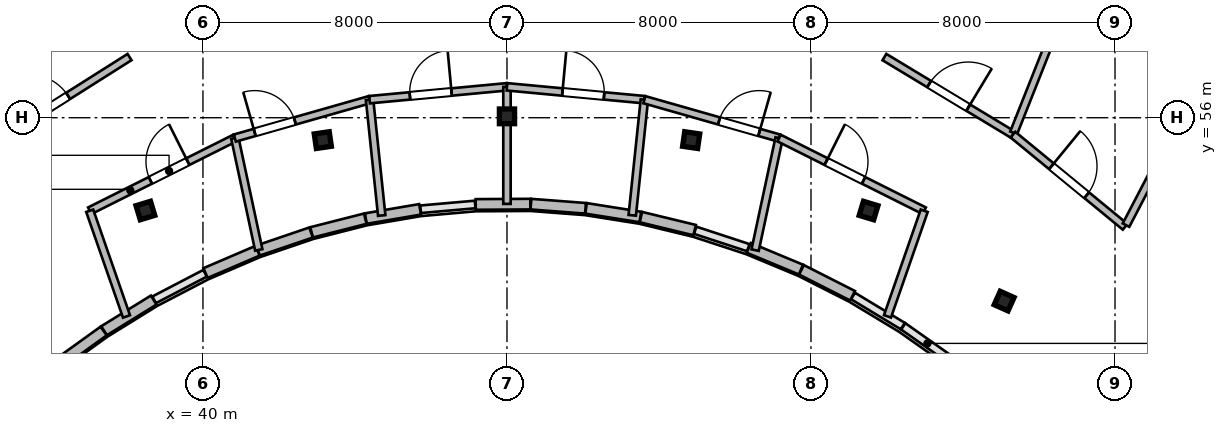
"""IFC4 building model, lengths in metres.
Left out: names, types, materials, properties, quantities, classifications, styles, units other than length and angle.
Written with IfcOpenShell. Run it as: python <this file> out.ifc"""

import sys

from ifc_helpers import new_model, si_unit, direction, frame, frame_2d, origin, origin_2d, place, context, subcontext, project, spatial, rectangle, i_section, extrude, source, transform, mapped, element, fill, save


model = new_model("IFC4")
c1 = context("Model", 3, precision=1e-05, world=origin(), true_north=direction((0.0, 1.0)))
c2 = subcontext(c1, "Body", "Model", "MODEL_VIEW")
j1 = project(units=[si_unit("LENGTHUNIT", "METRE"), si_unit("PLANEANGLEUNIT", "RADIAN")], contexts=[c1])
p1 = place(None, origin())
s1 = spatial("IfcSite", under=j1, at=p1, CompositionType="ELEMENT")
p2 = place(p1, origin())
s2 = spatial("IfcBuilding", under=s1, at=p2, CompositionType="ELEMENT")
p3 = place(p2, frame((0.0, 0.0, 287.4)))
s3 = spatial("IfcBuildingStorey", under=s2, at=p3, CompositionType="ELEMENT", Elevation=287.4)
m1 = source(origin(), c2, "Body", "SweptSolid", [
    extrude(i_section(OverallWidth=0.399, OverallDepth=0.387, WebThickness=0.021, FlangeThickness=0.033, at=origin_2d()), origin(), (0.0, 0.0, 1.0), 3.9),
])
for number, where, z_axis, x_axis in (
    (1, (38.485, 53.558, 0.0), (0.0, 0.0, 1.0), (-0.289, 0.957, 0.0)),
    (2, (43.154, 55.411, 0.0), (0.0, 0.0, 1.0), (-0.143, 0.99, 0.0)),
    (3, (48.0, 56.036, 0.0), (0.0, 0.0, 1.0), (0.0, 1.0, 0.0)),
    (4, (52.846, 55.411, 0.0), (0.0, 0.0, 1.0), (0.143, 0.99, 0.0)),
    (5, (57.515, 53.558, 0.0), (0.0, 0.0, 1.0), (0.289, 0.957, 0.0)),
    (6, (61.082, 51.175, 0.0), (0.0, 0.0, 1.0), (0.409, 0.912, 0.0)),
):
    element("IfcColumn", number, at=place(p3, frame(where, z_axis=z_axis, x_axis=x_axis)), inside=s3, PredefinedType="COLUMN", context=c2, shape_type="MappedRepresentation", body=[
        mapped(m1, transform((0.0, 0.0, 0.0), scale=1.0)),
    ])
m2 = source(origin(), c2, "Body", "SweptSolid", [
    extrude(rectangle(XDim=1.509, YDim=0.28, at=frame_2d((0.754, 0.0))), origin(), (0.0, 0.0, 1.0), 3.64),
])
p4 = place(p3, frame((57.094, 51.315, 0.0), z_axis=(0.0, 0.0, 1.0), x_axis=(-0.89169189228, 0.452642871635, 0.0)))
e7 = element("IfcWall", 7, at=p4, inside=s3, PredefinedType="SOLIDWALL", context=c2, shape_type="MappedRepresentation", body=[
    mapped(m2, transform((0.0, 0.0, 0.0), scale=1.0)),
])
m3 = source(origin(), c2, "Body", "SweptSolid", [
    extrude(rectangle(XDim=1.488, YDim=0.28, at=frame_2d((0.744, 0.0))), origin(), (0.0, 0.0, 1.0), 3.64),
])
p5 = place(p3, frame((55.736, 52.004, 0.0), z_axis=(0.0, 0.0, 1.0), x_axis=(-0.923261314935, 0.384172545017, 0.0)))
e8 = element("IfcWall", 8, at=p5, inside=s3, PredefinedType="SOLIDWALL", context=c2, shape_type="MappedRepresentation", body=[
    mapped(m3, transform((0.0, 0.0, 0.0), scale=1.0)),
])
m4 = source(origin(), c2, "Body", "SweptSolid", [
    extrude(rectangle(XDim=1.457, YDim=0.28, at=frame_2d((0.728, 0.0))), origin(), (0.0, 0.0, 1.0), 3.64),
])
p6 = place(p3, frame((52.939, 53.042, 0.0), z_axis=(0.0, 0.0, 1.0), x_axis=(-0.97187219902, 0.23550887196, 0.0)))
e9 = element("IfcWall", 9, at=p6, inside=s3, PredefinedType="SOLIDWALL", context=c2, shape_type="MappedRepresentation", body=[
    mapped(m4, transform((0.0, 0.0, 0.0), scale=1.0)),
])
m5 = source(origin(), c2, "Body", "SweptSolid", [
    extrude(rectangle(XDim=1.446, YDim=0.28, at=frame_2d((0.723, 0.0))), origin(), (0.0, 0.0, 1.0), 3.64),
])
p7 = place(p3, frame((51.509, 53.388, 0.0), z_axis=(0.0, 0.0, 1.0), x_axis=(-0.987650460941, 0.156673440642, 0.0)))
e10 = element("IfcWall", 10, at=p7, inside=s3, PredefinedType="SOLIDWALL", context=c2, shape_type="MappedRepresentation", body=[
    mapped(m5, transform((0.0, 0.0, 0.0), scale=1.0)),
])
m6 = source(origin(), c2, "Body", "SweptSolid", [
    extrude(rectangle(XDim=1.44, YDim=0.28, at=frame_2d((0.72, 0.0))), origin(), (0.0, 0.0, 1.0), 3.64),
])
p8 = place(p3, frame((50.066, 53.616, 0.0), z_axis=(0.0, 0.0, 1.0), x_axis=(-0.997124860794, 0.075776064736, 0.0)))
e11 = element("IfcWall", 11, at=p8, inside=s3, PredefinedType="SOLIDWALL", context=c2, shape_type="MappedRepresentation", body=[
    mapped(m6, transform((0.0, 0.0, 0.0), scale=1.0)),
])
m7 = source(origin(), c2, "Body", "SweptSolid", [
    extrude(rectangle(XDim=1.438, YDim=0.28, at=frame_2d((0.719, 0.0))), origin(), (0.0, 0.0, 1.0), 3.64),
])
p9 = place(p3, frame((48.615, 53.726, 0.0), z_axis=(0.0, 0.0, 1.0), x_axis=(-0.999982357135, -0.005940153174, 0.0)))
e12 = element("IfcWall", 12, at=p9, inside=s3, PredefinedType="SOLIDWALL", context=c2, shape_type="MappedRepresentation", body=[
    mapped(m7, transform((0.0, 0.0, 0.0), scale=1.0)),
])
m8 = source(origin(), c2, "Body", "SweptSolid", [
    extrude(rectangle(XDim=1.447, YDim=0.28, at=frame_2d((0.724, 0.0))), origin(), (0.0, 0.0, 1.0), 3.64),
])
p10 = place(p3, frame((45.713, 53.589, 0.0), z_axis=(0.0, 0.0, 1.0), x_axis=(-0.985785525921, -0.168008621461, 0.0)))
e13 = element("IfcWall", 13, at=p10, inside=s3, PredefinedType="SOLIDWALL", context=c2, shape_type="MappedRepresentation", body=[
    mapped(m8, transform((0.0, 0.0, 0.0), scale=1.0)),
])
m9 = source(origin(), c2, "Body", "SweptSolid", [
    extrude(rectangle(XDim=1.458, YDim=0.28, at=frame_2d((0.729, 0.0))), origin(), (0.0, 0.0, 1.0), 3.64),
])
p11 = place(p3, frame((44.271, 53.343, 0.0), z_axis=(0.0, 0.0, 1.0), x_axis=(-0.969109544438, -0.246630677083, 0.0)))
e14 = element("IfcWall", 14, at=p11, inside=s3, PredefinedType="SOLIDWALL", context=c2, shape_type="MappedRepresentation", body=[
    mapped(m9, transform((0.0, 0.0, 0.0), scale=1.0)),
])
m10 = source(origin(), c2, "Body", "SweptSolid", [
    extrude(rectangle(XDim=1.473, YDim=0.28, at=frame_2d((0.736, 0.0))), origin(), (0.0, 0.0, 1.0), 3.64),
])
p12 = place(p3, frame((42.845, 52.979, 0.0), z_axis=(0.0, 0.0, 1.0), x_axis=(-0.946641296917, -0.322289086026, 0.0)))
e15 = element("IfcWall", 15, at=p12, inside=s3, PredefinedType="SOLIDWALL", context=c2, shape_type="MappedRepresentation", body=[
    mapped(m10, transform((0.0, 0.0, 0.0), scale=1.0)),
])
m11 = source(origin(), c2, "Body", "SweptSolid", [
    extrude(rectangle(XDim=1.49, YDim=0.28, at=frame_2d((0.745, 0.0))), origin(), (0.0, 0.0, 1.0), 3.64),
])
p13 = place(p3, frame((41.438, 52.5, 0.0), z_axis=(0.0, 0.0, 1.0), x_axis=(-0.919009427656, -0.394235553799, 0.0)))
e16 = element("IfcWall", 16, at=p13, inside=s3, PredefinedType="SOLIDWALL", context=c2, shape_type="MappedRepresentation", body=[
    mapped(m11, transform((0.0, 0.0, 0.0), scale=1.0)),
])
m12 = source(origin(), c2, "Body", "SweptSolid", [
    extrude(rectangle(XDim=1.535, YDim=0.28, at=frame_2d((0.768, 0.0))), origin(), (0.0, 0.0, 1.0), 3.64),
])
p14 = place(p3, frame((38.704, 51.201, 0.0), z_axis=(0.0, 0.0, 1.0), x_axis=(-0.850756173541, -0.525560589449, 0.0)))
e17 = element("IfcWall", 17, at=p14, inside=s3, PredefinedType="SOLIDWALL", context=c2, shape_type="MappedRepresentation", body=[
    mapped(m12, transform((0.0, 0.0, 0.0), scale=1.0)),
])
m13 = source(origin(), c2, "Body", "SweptSolid", [
    extrude(rectangle(XDim=1.561, YDim=0.28, at=frame_2d((0.781, 0.0))), origin(), (0.0, 0.0, 1.0), 3.64),
])
p15 = place(p3, frame((37.387, 50.387, 0.0), z_axis=(0.0, 0.0, 1.0), x_axis=(-0.81154027425, -0.584296485758, 0.0)))
e18 = element("IfcWall", 18, at=p15, inside=s3, PredefinedType="SOLIDWALL", context=c2, shape_type="MappedRepresentation", body=[
    mapped(m13, transform((0.0, 0.0, 0.0), scale=1.0)),
])
m14 = source(origin(), c2, "Body", "SweptSolid", [
    extrude(rectangle(XDim=4.271, YDim=0.195, at=frame_2d((2.135, 0.0))), origin(), (0.0, 0.0, 1.0), 3.64),
])
p16 = place(p3, frame((37.021, 53.552, 0.0), z_axis=(0.0, 0.0, 1.0), x_axis=(0.894061035522, 0.447945158207, 0.0)))
e19 = element("IfcWall", 19, at=p16, inside=s3, PredefinedType="PARTITIONING", context=c2, shape_type="MappedRepresentation", body=[
    mapped(m14, transform((0.0, 0.0, 0.0), scale=1.0)),
])
p17 = place(p16, frame((1.785, 0.0, 0.0)))
e20 = element("IfcOpeningElement", 20, at=p17, cuts=e19, PredefinedType="OPENING", context=c2, shape_type="SweptSolid", body=[
    extrude(rectangle(XDim=1.1, YDim=2.15, at=frame_2d((0.55, 1.075))), frame((0.0, 0.107, 0.0), z_axis=(0.0, -1.0, 0.0), x_axis=(1.0, 0.0, 0.0)), (0.0, 0.0, 1.0), 0.215),
])
m15 = source(origin(), c2, "Body", "SweptSolid", [
    extrude(rectangle(XDim=2.944, YDim=0.195, at=frame_2d((1.472, 0.0))), origin(), (0.0, 0.0, 1.0), 3.64),
])
p18 = place(p3, frame((37.988, 50.771, 0.0), z_axis=(0.0, 0.0, 1.0), x_axis=(-0.328565655286, 0.944481132774, 0.0)))
e21 = element("IfcWall", 21, at=p18, inside=s3, PredefinedType="PARTITIONING", context=c2, shape_type="MappedRepresentation", body=[
    mapped(m15, transform((0.0, 0.0, 0.0), scale=1.0)),
])
m16 = source(origin(), c2, "Body", "SweptSolid", [
    extrude(rectangle(XDim=3.01, YDim=0.195, at=frame_2d((1.505, 0.0))), origin(), (0.0, 0.0, 1.0), 3.64),
])
p19 = place(p3, frame((41.469, 52.521, 0.0), z_axis=(0.0, 0.0, 1.0), x_axis=(-0.209279797988, 0.977855800287, 0.0)))
e22 = element("IfcWall", 22, at=p19, inside=s3, PredefinedType="PARTITIONING", context=c2, shape_type="MappedRepresentation", body=[
    mapped(m16, transform((0.0, 0.0, 0.0), scale=1.0)),
])
m17 = source(origin(), c2, "Body", "SweptSolid", [
    extrude(rectangle(XDim=3.687, YDim=0.195, at=frame_2d((1.843, 0.0))), origin(), (0.0, 0.0, 1.0), 3.64),
])
p20 = place(p3, frame((40.839, 55.465, 0.0), z_axis=(0.0, 0.0, 1.0), x_axis=(0.961753532248, 0.27391630694, 0.0)))
e23 = element("IfcWall", 23, at=p20, inside=s3, PredefinedType="PARTITIONING", context=c2, shape_type="MappedRepresentation", body=[
    mapped(m17, transform((0.0, 0.0, 0.0), scale=1.0)),
])
p21 = place(p20, frame((0.543, 0.0, 0.0)))
e24 = element("IfcOpeningElement", 24, at=p21, cuts=e23, PredefinedType="OPENING", context=c2, shape_type="SweptSolid", body=[
    extrude(rectangle(XDim=1.1, YDim=2.15, at=frame_2d((0.55, 1.075))), frame((0.0, 0.107, 0.0), z_axis=(0.0, -1.0, 0.0), x_axis=(1.0, 0.0, 0.0)), (0.0, 0.0, 1.0), 0.215),
])
m18 = source(origin(), c2, "Body", "SweptSolid", [
    extrude(rectangle(XDim=3.063, YDim=0.195, at=frame_2d((1.532, 0.0))), origin(), (0.0, 0.0, 1.0), 3.64),
])
p22 = place(p3, frame((44.704, 53.427, 0.0), z_axis=(0.0, 0.0, 1.0), x_axis=(-0.104315578516, 0.994544247421, 0.0)))
e25 = element("IfcWall", 25, at=p22, inside=s3, PredefinedType="PARTITIONING", context=c2, shape_type="MappedRepresentation", body=[
    mapped(m18, transform((0.0, 0.0, 0.0), scale=1.0)),
])
m19 = source(origin(), c2, "Body", "SweptSolid", [
    extrude(rectangle(XDim=3.632, YDim=0.195, at=frame_2d((1.816, 0.0))), origin(), (0.0, 0.0, 1.0), 3.64),
])
p23 = place(p3, frame((44.384, 56.474, 0.0), z_axis=(0.0, 0.0, 1.0), x_axis=(0.99563695898, 0.093311552942, 0.0)))
e26 = element("IfcWall", 26, at=p23, inside=s3, PredefinedType="PARTITIONING", context=c2, shape_type="MappedRepresentation", body=[
    mapped(m19, transform((0.0, 0.0, 0.0), scale=1.0)),
])
p24 = place(p23, frame((1.066, 0.0, 0.0)))
e27 = element("IfcOpeningElement", 27, at=p24, cuts=e26, PredefinedType="OPENING", context=c2, shape_type="SweptSolid", body=[
    extrude(rectangle(XDim=1.1, YDim=2.15, at=frame_2d((0.55, 1.075))), frame((0.0, 0.107, 0.0), z_axis=(0.0, -1.0, 0.0), x_axis=(1.0, 0.0, 0.0)), (0.0, 0.0, 1.0), 0.215),
])
m20 = source(origin(), c2, "Body", "SweptSolid", [
    extrude(rectangle(XDim=3.081, YDim=0.195, at=frame_2d((1.54, 0.0))), origin(), (0.0, 0.0, 1.0), 3.314),
])
p25 = place(p3, frame((48.0, 53.733, 0.0), z_axis=(0.0, 0.0, 1.0), x_axis=(0.0, 1.0, 0.0)))
e28 = element("IfcWall", 28, at=p25, inside=s3, PredefinedType="PARTITIONING", context=c2, shape_type="MappedRepresentation", body=[
    mapped(m20, transform((0.0, 0.0, 0.0), scale=1.0)),
])
p26 = place(p3, frame((48.0, 56.813, 0.0), z_axis=(0.0, 0.0, 1.0), x_axis=(0.99563695898, -0.093311552942, 0.0)))
e29 = element("IfcWall", 29, at=p26, inside=s3, PredefinedType="PARTITIONING", context=c2, shape_type="MappedRepresentation", body=[
    mapped(m19, transform((0.0, 0.0, 0.0), scale=1.0)),
])
p27 = place(p26, frame((1.466, 0.0, 0.0)))
e30 = element("IfcOpeningElement", 30, at=p27, cuts=e29, PredefinedType="OPENING", context=c2, shape_type="SweptSolid", body=[
    extrude(rectangle(XDim=1.1, YDim=2.15, at=frame_2d((0.55, 1.075))), frame((0.0, 0.107, 0.0), z_axis=(0.0, -1.0, 0.0), x_axis=(1.0, 0.0, 0.0)), (0.0, 0.0, 1.0), 0.215),
])
m21 = source(origin(), c2, "Body", "SweptSolid", [
    extrude(rectangle(XDim=3.059, YDim=0.195, at=frame_2d((1.53, 0.0))), origin(), (0.0, 0.0, 1.0), 3.64),
])
p28 = place(p3, frame((51.297, 53.432, 0.0), z_axis=(0.0, 0.0, 1.0), x_axis=(0.10430673596, 0.994545174858, 0.0)))
e31 = element("IfcWall", 31, at=p28, inside=s3, PredefinedType="PARTITIONING", context=c2, shape_type="MappedRepresentation", body=[
    mapped(m21, transform((0.0, 0.0, 0.0), scale=1.0)),
])
p29 = place(p3, frame((51.616, 56.474, 0.0), z_axis=(0.0, 0.0, 1.0), x_axis=(0.961753532248, -0.27391630694, 0.0)))
e32 = element("IfcWall", 32, at=p29, inside=s3, PredefinedType="PARTITIONING", context=c2, shape_type="MappedRepresentation", body=[
    mapped(m17, transform((0.0, 0.0, 0.0), scale=1.0)),
])
p30 = place(p29, frame((2.043, 0.0, 0.0)))
e33 = element("IfcOpeningElement", 33, at=p30, cuts=e32, PredefinedType="OPENING", context=c2, shape_type="SweptSolid", body=[
    extrude(rectangle(XDim=1.1, YDim=2.15, at=frame_2d((0.55, 1.075))), frame((0.0, 0.107, 0.0), z_axis=(0.0, -1.0, 0.0), x_axis=(1.0, 0.0, 0.0)), (0.0, 0.0, 1.0), 0.215),
])
m22 = source(origin(), c2, "Body", "SweptSolid", [
    extrude(rectangle(XDim=3.015, YDim=0.195, at=frame_2d((1.507, 0.0))), origin(), (0.0, 0.0, 1.0), 3.64),
])
p31 = place(p3, frame((54.53, 52.517, 0.0), z_axis=(0.0, 0.0, 1.0), x_axis=(0.209258086484, 0.977860446711, 0.0)))
e34 = element("IfcWall", 34, at=p31, inside=s3, PredefinedType="PARTITIONING", context=c2, shape_type="MappedRepresentation", body=[
    mapped(m22, transform((0.0, 0.0, 0.0), scale=1.0)),
])
p32 = place(p3, frame((55.161, 55.465, 0.0), z_axis=(0.0, 0.0, 1.0), x_axis=(0.894061035522, -0.447945158207, 0.0)))
e35 = element("IfcWall", 35, at=p32, inside=s3, PredefinedType="PARTITIONING", context=c2, shape_type="MappedRepresentation", body=[
    mapped(m14, transform((0.0, 0.0, 0.0), scale=1.0)),
])
p33 = place(p32, frame((1.385, 0.0, 0.0)))
e36 = element("IfcOpeningElement", 36, at=p33, cuts=e35, PredefinedType="OPENING", context=c2, shape_type="SweptSolid", body=[
    extrude(rectangle(XDim=1.1, YDim=2.15, at=frame_2d((0.55, 1.075))), frame((0.0, 0.107, 0.0), z_axis=(0.0, -1.0, 0.0), x_axis=(1.0, 0.0, 0.0)), (0.0, 0.0, 1.0), 0.215),
])
m23 = source(origin(), c2, "Body", "SweptSolid", [
    extrude(rectangle(XDim=2.942, YDim=0.195, at=frame_2d((1.471, 0.0))), origin(), (0.0, 0.0, 1.0), 3.64),
])
p34 = place(p3, frame((58.013, 50.773, 0.0), z_axis=(0.0, 0.0, 1.0), x_axis=(0.328623620494, 0.944460965871, 0.0)))
e37 = element("IfcWall", 37, at=p34, inside=s3, PredefinedType="PARTITIONING", context=c2, shape_type="MappedRepresentation", body=[
    mapped(m23, transform((0.0, 0.0, 0.0), scale=1.0)),
])
m24 = source(origin(), c2, "Body", "SweptSolid", [
    extrude(rectangle(XDim=5.025, YDim=0.195, at=frame_2d((2.513, 0.0))), origin(), (0.0, 0.0, 1.0), 3.64),
])
p35 = place(p3, frame((33.82, 54.911, 0.0), z_axis=(0.0, 0.0, 1.0), x_axis=(0.84532378062, 0.534254345717, 0.0)))
e38 = element("IfcWall", 38, at=p35, inside=s3, PredefinedType="PARTITIONING", context=c2, shape_type="MappedRepresentation", body=[
    mapped(m24, transform((0.0, 0.0, 0.0), scale=1.0)),
])
p36 = place(p35, frame((1.913, 0.0, 0.0)))
e39 = element("IfcOpeningElement", 39, at=p36, cuts=e38, PredefinedType="OPENING", context=c2, shape_type="SweptSolid", body=[
    extrude(rectangle(XDim=1.2, YDim=2.15, at=frame_2d((0.6, 1.075))), frame((0.0, 0.107, 0.0), z_axis=(0.0, -1.0, 0.0), x_axis=(1.0, 0.0, 0.0)), (0.0, 0.0, 1.0), 0.215),
])
m25 = source(origin(), c2, "Body", "SweptSolid", [
    extrude(rectangle(XDim=3.951, YDim=0.195, at=frame_2d((1.975, 0.0))), origin(), (0.0, 0.0, 1.0), 3.64),
])
p37 = place(p3, frame((57.932, 57.596, 0.0), z_axis=(0.0, 0.0, 1.0), x_axis=(0.856137696849, -0.51674775668, 0.0)))
e40 = element("IfcWall", 40, at=p37, inside=s3, PredefinedType="PARTITIONING", context=c2, shape_type="MappedRepresentation", body=[
    mapped(m25, transform((0.0, 0.0, 0.0), scale=1.0)),
])
p38 = place(p37, frame((1.375, 0.0, 0.0)))
e41 = element("IfcOpeningElement", 41, at=p38, cuts=e40, PredefinedType="OPENING", context=c2, shape_type="SweptSolid", body=[
    extrude(rectangle(XDim=1.2, YDim=2.15, at=frame_2d((0.6, 1.075))), frame((0.0, 0.107, 0.0), z_axis=(0.0, -1.0, 0.0), x_axis=(1.0, 0.0, 0.0)), (0.0, 0.0, 1.0), 0.215),
])
m26 = source(origin(), c2, "Body", "SweptSolid", [
    extrude(rectangle(XDim=17.664, YDim=0.195, at=frame_2d((8.832, 0.0))), origin(), (0.0, 0.0, 1.0), 3.64),
])
p39 = place(p3, frame((61.333, 55.602, 0.0), z_axis=(0.0, 0.0, 1.0), x_axis=(0.368827513738, 0.929497856431, 0.0)))
e42 = element("IfcWall", 42, at=p39, inside=s3, PredefinedType="PARTITIONING", context=c2, shape_type="MappedRepresentation", body=[
    mapped(m26, transform((0.0, 0.0, 0.0), scale=1.0)),
])
m27 = source(origin(), c2, "Body", "SweptSolid", [
    extrude(rectangle(XDim=3.82, YDim=0.195, at=frame_2d((1.91, 0.0))), origin(), (0.0, 0.0, 1.0), 3.64),
])
p40 = place(p3, frame((61.314, 55.554, 0.0), z_axis=(0.0, 0.0, 1.0), x_axis=(0.772805728445, -0.63464266015, 0.0)))
e43 = element("IfcWall", 43, at=p40, inside=s3, PredefinedType="PARTITIONING", context=c2, shape_type="MappedRepresentation", body=[
    mapped(m27, transform((0.0, 0.0, 0.0), scale=1.0)),
])
p41 = place(p40, frame((1.31, 0.0, 0.0)))
e44 = element("IfcOpeningElement", 44, at=p41, cuts=e43, PredefinedType="OPENING", context=c2, shape_type="SweptSolid", body=[
    extrude(rectangle(XDim=1.2, YDim=2.15, at=frame_2d((0.6, 1.075))), frame((0.0, 0.107, 0.0), z_axis=(0.0, -1.0, 0.0), x_axis=(1.0, 0.0, 0.0)), (0.0, 0.0, 1.0), 0.215),
])
m28 = source(origin(), c2, "Body", "SweptSolid", [
    extrude(rectangle(XDim=16.43, YDim=0.195, at=frame_2d((8.215, 0.0))), origin(), (0.0, 0.0, 1.0), 3.64),
])
p42 = place(p3, frame((64.29, 53.174, 0.0), z_axis=(0.0, 0.0, 1.0), x_axis=(0.463119459371, 0.886295868405, 0.0)))
e45 = element("IfcWall", 45, at=p42, inside=s3, PredefinedType="PARTITIONING", context=c2, shape_type="MappedRepresentation", body=[
    mapped(m28, transform((0.0, 0.0, 0.0), scale=1.0)),
])
m29 = source(origin(), c2, "Body", "SweptSolid", [
    extrude(rectangle(XDim=1.1, YDim=2.15, at=frame_2d((0.55, 1.075))), frame((0.0, 0.025, 0.0), z_axis=(0.0, -1.0, 0.0), x_axis=(1.0, 0.0, 0.0)), (0.0, 0.0, 1.0), 0.05),
])
p43 = place(p17, origin())
e46 = element("IfcDoor", 46, at=p43, inside=s3, OperationType="SINGLE_SWING_RIGHT", PredefinedType="DOOR", context=c2, shape_type="MappedRepresentation", body=[
    mapped(m29, transform((0.0, 0.0, 0.0), scale=1.0)),
])
fill(e20, e46)
p44 = place(p21, origin())
e47 = element("IfcDoor", 47, at=p44, inside=s3, OperationType="SINGLE_SWING_LEFT", PredefinedType="DOOR", context=c2, shape_type="MappedRepresentation", body=[
    mapped(m29, transform((0.0, 0.0, 0.0), scale=1.0)),
])
fill(e24, e47)
p45 = place(p24, origin())
e48 = element("IfcDoor", 48, at=p45, inside=s3, OperationType="SINGLE_SWING_RIGHT", PredefinedType="DOOR", context=c2, shape_type="MappedRepresentation", body=[
    mapped(m29, transform((0.0, 0.0, 0.0), scale=1.0)),
])
fill(e27, e48)
p46 = place(p27, origin())
e49 = element("IfcDoor", 49, at=p46, inside=s3, OperationType="SINGLE_SWING_LEFT", PredefinedType="DOOR", context=c2, shape_type="MappedRepresentation", body=[
    mapped(m29, transform((0.0, 0.0, 0.0), scale=1.0)),
])
fill(e30, e49)
p47 = place(p30, origin())
e50 = element("IfcDoor", 50, at=p47, inside=s3, OperationType="SINGLE_SWING_RIGHT", PredefinedType="DOOR", context=c2, shape_type="MappedRepresentation", body=[
    mapped(m29, transform((0.0, 0.0, 0.0), scale=1.0)),
])
fill(e33, e50)
p48 = place(p33, origin())
e51 = element("IfcDoor", 51, at=p48, inside=s3, OperationType="SINGLE_SWING_LEFT", PredefinedType="DOOR", context=c2, shape_type="MappedRepresentation", body=[
    mapped(m29, transform((0.0, 0.0, 0.0), scale=1.0)),
])
fill(e36, e51)
m30 = source(origin(), c2, "Body", "SweptSolid", [
    extrude(rectangle(XDim=1.2, YDim=2.15, at=frame_2d((0.6, 1.075))), frame((0.0, 0.025, 0.0), z_axis=(0.0, -1.0, 0.0), x_axis=(1.0, 0.0, 0.0)), (0.0, 0.0, 1.0), 0.05),
])
p49 = place(p36, origin())
e52 = element("IfcDoor", 52, at=p49, inside=s3, OperationType="SINGLE_SWING_LEFT", PredefinedType="DOOR", context=c2, shape_type="MappedRepresentation", body=[
    mapped(m30, transform((0.0, 0.0, 0.0), scale=1.0)),
])
fill(e39, e52)
p50 = place(p38, origin())
e53 = element("IfcDoor", 53, at=p50, inside=s3, OperationType="SINGLE_SWING_RIGHT", PredefinedType="DOOR", context=c2, shape_type="MappedRepresentation", body=[
    mapped(m30, transform((0.0, 0.0, 0.0), scale=1.0)),
])
fill(e41, e53)
p51 = place(p41, origin())
e54 = element("IfcDoor", 54, at=p51, inside=s3, OperationType="SINGLE_SWING_LEFT", PredefinedType="DOOR", context=c2, shape_type="MappedRepresentation", body=[
    mapped(m30, transform((0.0, 0.0, 0.0), scale=1.0)),
])
fill(e44, e54)
save(model, sys.argv[1])
